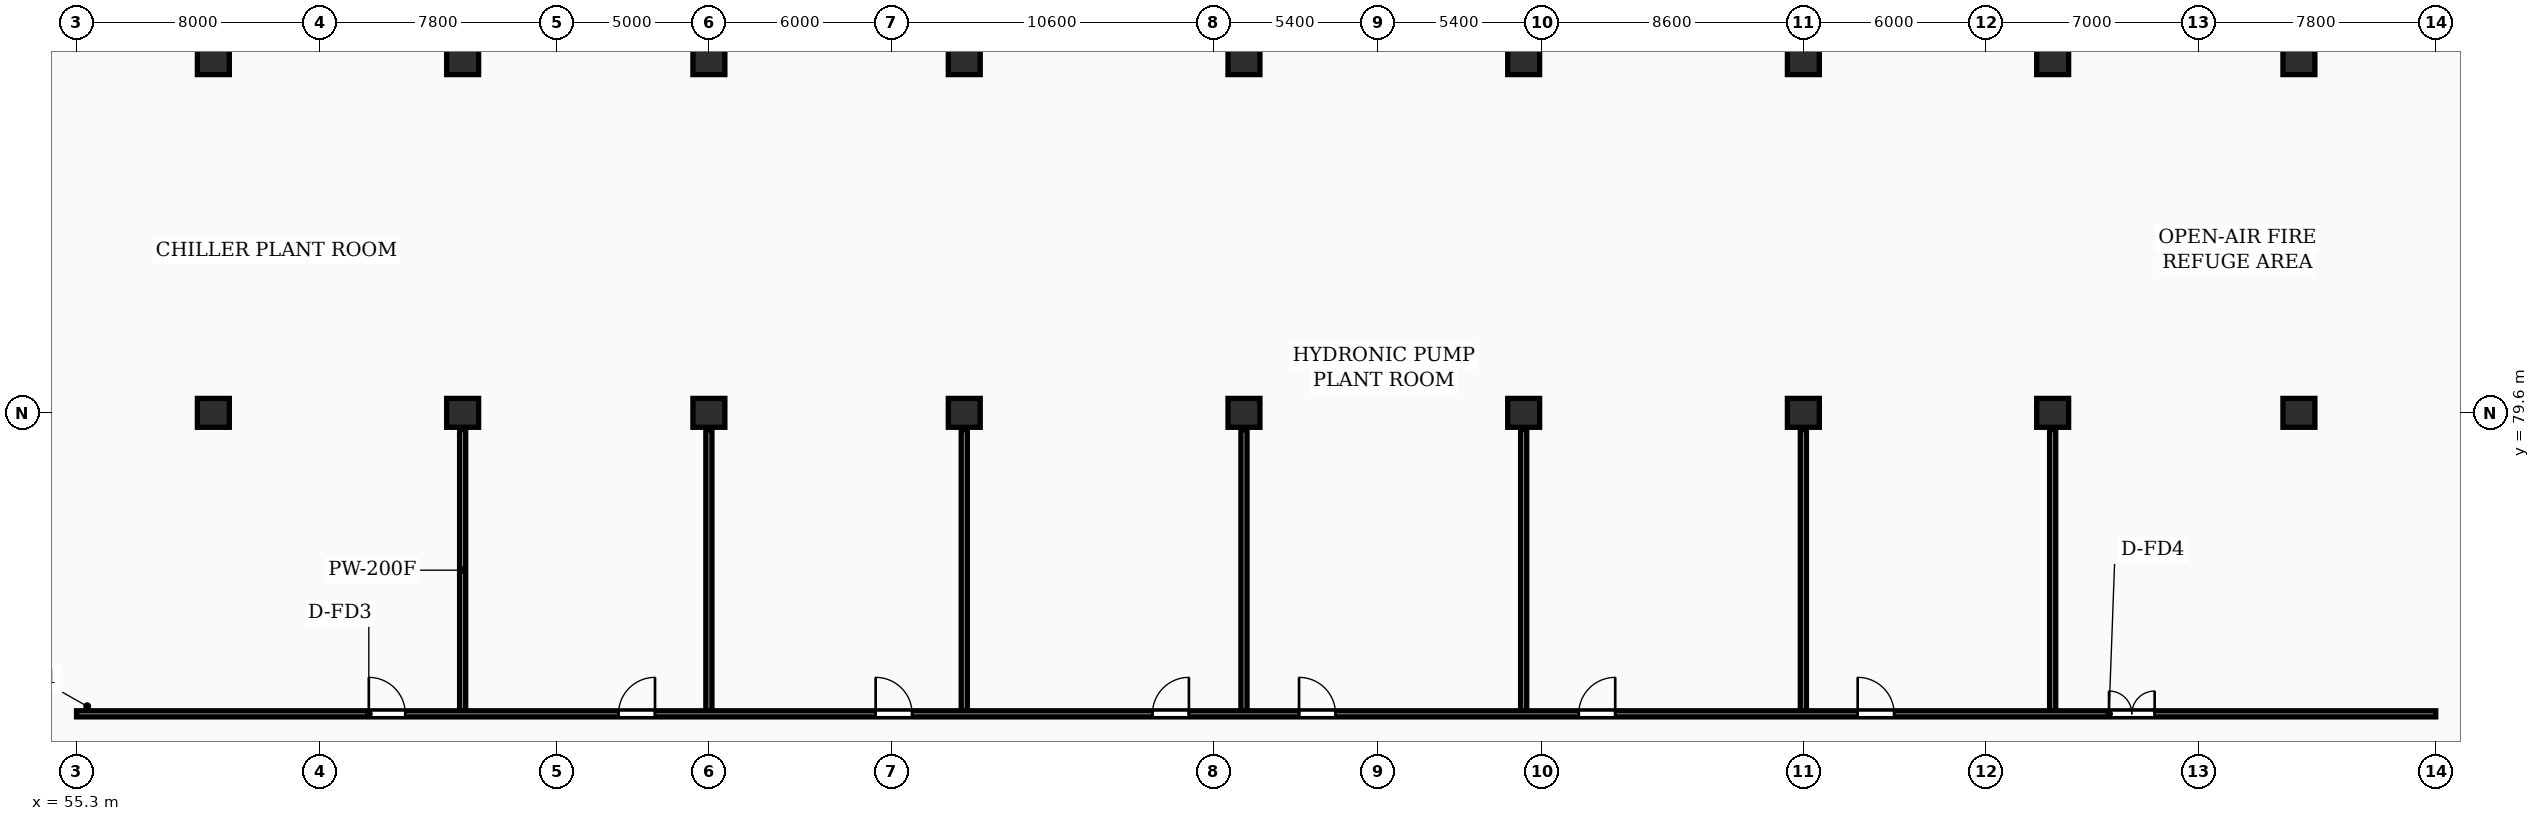
"""IFC4 building model, lengths in metres.
Left out: names, types, materials, properties, quantities, classifications, styles, units other than length and angle.
Written with IfcOpenShell. Run it as: python <this file> out.ifc"""

import sys

from ifc_helpers import new_model, si_unit, direction, frame, frame_2d, origin, origin_2d, place, context, subcontext, project, spatial, rectangle, extrude, element, fill, save


model = new_model("IFC4")
c1 = context("Model", 3, precision=1e-05, world=origin(), true_north=direction((0.0, 1.0)))
c2 = subcontext(c1, "Body", "Model", "MODEL_VIEW")
j1 = project(units=[si_unit("LENGTHUNIT", "METRE"), si_unit("PLANEANGLEUNIT", "RADIAN")], contexts=[c1])
p1 = place(None, origin())
s1 = spatial("IfcSite", under=j1, at=p1, CompositionType="ELEMENT")
p2 = place(p1, origin())
s2 = spatial("IfcBuilding", under=s1, at=p2, CompositionType="ELEMENT")
p3 = place(p2, frame((0.0, 0.0, 76.0)))
s3 = spatial("IfcBuildingStorey", under=s2, at=p3, CompositionType="ELEMENT", Elevation=76.0)
for number, where, z_axis, x_axis in (
    (1, (59.8, 79.6, 0.0), (0.0, 0.0, 1.0), (1.0, 0.0, 0.0)),
    (2, (59.8, 91.2, 0.0), (0.0, 0.0, 1.0), (1.0, 0.0, 0.0)),
    (3, (68.0, 79.6, 0.0), (0.0, 0.0, 1.0), (1.0, 0.0, 0.0)),
    (4, (68.0, 91.2, 0.0), (0.0, 0.0, 1.0), (1.0, 0.0, 0.0)),
    (5, (76.1, 79.6, 0.0), (0.0, 0.0, 1.0), (1.0, 0.0, 0.0)),
    (6, (76.1, 91.2, 0.0), (0.0, 0.0, 1.0), (1.0, 0.0, 0.0)),
    (7, (84.5, 79.6, 0.0), (0.0, 0.0, 1.0), (1.0, 0.0, 0.0)),
    (8, (84.5, 91.2, 0.0), (0.0, 0.0, 1.0), (1.0, 0.0, 0.0)),
    (9, (93.7, 79.6, 0.0), (0.0, 0.0, 1.0), (1.0, 0.0, 0.0)),
    (10, (93.7, 91.2, 0.0), (0.0, 0.0, 1.0), (1.0, 0.0, 0.0)),
    (11, (102.9, 79.6, 0.0), (0.0, 0.0, 1.0), (1.0, 0.0, 0.0)),
    (12, (102.9, 91.2, 0.0), (0.0, 0.0, 1.0), (1.0, 0.0, 0.0)),
    (13, (112.1, 79.6, 0.0), (0.0, 0.0, 1.0), (1.0, 0.0, 0.0)),
    (14, (112.1, 91.2, 0.0), (0.0, 0.0, 1.0), (1.0, 0.0, 0.0)),
    (15, (120.3, 79.6, 0.0), (0.0, 0.0, 1.0), (1.0, 0.0, 0.0)),
    (16, (120.3, 91.2, 0.0), (0.0, 0.0, 1.0), (1.0, 0.0, 0.0)),
    (17, (128.4, 79.6, 0.0), (0.0, 0.0, 1.0), (1.0, 0.0, 0.0)),
    (18, (128.4, 91.2, 0.0), (0.0, 0.0, 1.0), (1.0, 0.0, 0.0)),
):
    element("IfcColumn", number, at=place(p3, frame(where, z_axis=z_axis, x_axis=x_axis)), inside=s3, PredefinedType="COLUMN", context=c2, shape_type="SweptSolid", body=[
        extrude(rectangle(XDim=1.05, YDim=0.95, at=origin_2d()), origin(), (0.0, 0.0, 1.0), 4.8),
    ])
for number, where, z_axis, x_axis in (
    (19, (68.0, 69.8, 0.0), (0.0, 0.0, 1.0), (0.0, 1.0, 0.0)),
    (20, (76.1, 69.8, 0.0), (0.0, 0.0, 1.0), (0.0, 1.0, 0.0)),
    (21, (84.5, 69.8, 0.0), (0.0, 0.0, 1.0), (0.0, 1.0, 0.0)),
    (22, (93.7, 69.8, 0.0), (0.0, 0.0, 1.0), (0.0, 1.0, 0.0)),
    (23, (102.9, 69.8, 0.0), (0.0, 0.0, 1.0), (0.0, 1.0, 0.0)),
    (24, (112.1, 69.8, 0.0), (0.0, 0.0, 1.0), (0.0, 1.0, 0.0)),
    (25, (120.3, 69.8, 0.0), (0.0, 0.0, 1.0), (0.0, 1.0, 0.0)),
):
    element("IfcWall", number, at=place(p3, frame(where, z_axis=z_axis, x_axis=x_axis)), inside=s3, PredefinedType="PARTITIONING", context=c2, shape_type="SweptSolid", body=[
        extrude(rectangle(XDim=9.25, YDim=0.2, at=frame_2d((4.625, 0.0))), origin(), (0.0, 0.0, 1.0), 3.23),
    ])
p4 = place(p3, frame((55.3, 69.7, 0.0), z_axis=(0.0, 0.0, 1.0), x_axis=(1.0, 0.0, 0.0)))
e26 = element("IfcWall", 26, at=p4, inside=s3, PredefinedType="PARTITIONING", context=c2, shape_type="SweptSolid", body=[
    extrude(rectangle(XDim=77.6, YDim=0.2, at=frame_2d((38.8, 0.0))), origin(), (0.0, 0.0, 1.0), 4.48),
])
p5 = place(p4, frame((9.614, 0.0, 0.0)))
e27 = element("IfcOpeningElement", 27, at=p5, cuts=e26, PredefinedType="OPENING", context=c2, shape_type="SweptSolid", body=[
    extrude(rectangle(XDim=1.2, YDim=2.15, at=frame_2d((0.6, 1.075))), frame((0.0, 0.11, 0.0), z_axis=(0.0, -1.0, 0.0), x_axis=(1.0, 0.0, 0.0)), (0.0, 0.0, 1.0), 0.22),
])
p6 = place(p4, frame((17.828, 0.0, 0.0)))
e28 = element("IfcOpeningElement", 28, at=p6, cuts=e26, PredefinedType="OPENING", context=c2, shape_type="SweptSolid", body=[
    extrude(rectangle(XDim=1.2, YDim=2.15, at=frame_2d((0.6, 1.075))), frame((0.0, 0.11, 0.0), z_axis=(0.0, -1.0, 0.0), x_axis=(1.0, 0.0, 0.0)), (0.0, 0.0, 1.0), 0.22),
])
p7 = place(p4, frame((26.285, 0.0, 0.0)))
e29 = element("IfcOpeningElement", 29, at=p7, cuts=e26, PredefinedType="OPENING", context=c2, shape_type="SweptSolid", body=[
    extrude(rectangle(XDim=1.2, YDim=2.15, at=frame_2d((0.6, 1.075))), frame((0.0, 0.11, 0.0), z_axis=(0.0, -1.0, 0.0), x_axis=(1.0, 0.0, 0.0)), (0.0, 0.0, 1.0), 0.22),
])
p8 = place(p4, frame((35.389, 0.0, 0.0)))
e30 = element("IfcOpeningElement", 30, at=p8, cuts=e26, PredefinedType="OPENING", context=c2, shape_type="SweptSolid", body=[
    extrude(rectangle(XDim=1.2, YDim=2.15, at=frame_2d((0.6, 1.075))), frame((0.0, 0.11, 0.0), z_axis=(0.0, -1.0, 0.0), x_axis=(1.0, 0.0, 0.0)), (0.0, 0.0, 1.0), 0.22),
])
p9 = place(p4, frame((40.211, 0.0, 0.0)))
e31 = element("IfcOpeningElement", 31, at=p9, cuts=e26, PredefinedType="OPENING", context=c2, shape_type="SweptSolid", body=[
    extrude(rectangle(XDim=1.2, YDim=2.15, at=frame_2d((0.6, 1.075))), frame((0.0, 0.11, 0.0), z_axis=(0.0, -1.0, 0.0), x_axis=(1.0, 0.0, 0.0)), (0.0, 0.0, 1.0), 0.22),
])
p10 = place(p4, frame((49.411, 0.0, 0.0)))
e32 = element("IfcOpeningElement", 32, at=p10, cuts=e26, PredefinedType="OPENING", context=c2, shape_type="SweptSolid", body=[
    extrude(rectangle(XDim=1.2, YDim=2.15, at=frame_2d((0.6, 1.075))), frame((0.0, 0.11, 0.0), z_axis=(0.0, -1.0, 0.0), x_axis=(1.0, 0.0, 0.0)), (0.0, 0.0, 1.0), 0.22),
])
p11 = place(p4, frame((58.586, 0.0, 0.0)))
e33 = element("IfcOpeningElement", 33, at=p11, cuts=e26, PredefinedType="OPENING", context=c2, shape_type="SweptSolid", body=[
    extrude(rectangle(XDim=1.2, YDim=2.15, at=frame_2d((0.6, 1.075))), frame((0.0, 0.11, 0.0), z_axis=(0.0, -1.0, 0.0), x_axis=(1.0, 0.0, 0.0)), (0.0, 0.0, 1.0), 0.22),
])
p12 = place(p4, frame((66.854, 0.0, 0.0)))
e34 = element("IfcOpeningElement", 34, at=p12, cuts=e26, PredefinedType="OPENING", context=c2, shape_type="SweptSolid", body=[
    extrude(rectangle(XDim=1.5, YDim=2.18, at=frame_2d((0.75, 1.09))), frame((0.0, 0.11, 0.0), z_axis=(0.0, -1.0, 0.0), x_axis=(1.0, 0.0, 0.0)), (0.0, 0.0, 1.0), 0.22),
])
p13 = place(p5, origin())
e35 = element("IfcDoor", 35, at=p13, inside=s3, OperationType="SINGLE_SWING_LEFT", PredefinedType="DOOR", context=c2, shape_type="SweptSolid", body=[
    extrude(rectangle(XDim=1.2, YDim=2.15, at=frame_2d((0.6, 1.075))), frame((0.0, 0.025, 0.0), z_axis=(0.0, -1.0, 0.0), x_axis=(1.0, 0.0, 0.0)), (0.0, 0.0, 1.0), 0.05),
])
fill(e27, e35)
p14 = place(p6, origin())
e36 = element("IfcDoor", 36, at=p14, inside=s3, OperationType="SINGLE_SWING_RIGHT", PredefinedType="DOOR", context=c2, shape_type="SweptSolid", body=[
    extrude(rectangle(XDim=1.2, YDim=2.15, at=frame_2d((0.6, 1.075))), frame((0.0, 0.025, 0.0), z_axis=(0.0, -1.0, 0.0), x_axis=(1.0, 0.0, 0.0)), (0.0, 0.0, 1.0), 0.05),
])
fill(e28, e36)
p15 = place(p7, origin())
e37 = element("IfcDoor", 37, at=p15, inside=s3, OperationType="SINGLE_SWING_LEFT", PredefinedType="DOOR", context=c2, shape_type="SweptSolid", body=[
    extrude(rectangle(XDim=1.2, YDim=2.15, at=frame_2d((0.6, 1.075))), frame((0.0, 0.025, 0.0), z_axis=(0.0, -1.0, 0.0), x_axis=(1.0, 0.0, 0.0)), (0.0, 0.0, 1.0), 0.05),
])
fill(e29, e37)
p16 = place(p8, origin())
e38 = element("IfcDoor", 38, at=p16, inside=s3, OperationType="SINGLE_SWING_RIGHT", PredefinedType="DOOR", context=c2, shape_type="SweptSolid", body=[
    extrude(rectangle(XDim=1.2, YDim=2.15, at=frame_2d((0.6, 1.075))), frame((0.0, 0.025, 0.0), z_axis=(0.0, -1.0, 0.0), x_axis=(1.0, 0.0, 0.0)), (0.0, 0.0, 1.0), 0.05),
])
fill(e30, e38)
p17 = place(p9, origin())
e39 = element("IfcDoor", 39, at=p17, inside=s3, OperationType="SINGLE_SWING_LEFT", PredefinedType="DOOR", context=c2, shape_type="SweptSolid", body=[
    extrude(rectangle(XDim=1.2, YDim=2.15, at=frame_2d((0.6, 1.075))), frame((0.0, 0.025, 0.0), z_axis=(0.0, -1.0, 0.0), x_axis=(1.0, 0.0, 0.0)), (0.0, 0.0, 1.0), 0.05),
])
fill(e31, e39)
p18 = place(p10, origin())
e40 = element("IfcDoor", 40, at=p18, inside=s3, OperationType="SINGLE_SWING_RIGHT", PredefinedType="DOOR", context=c2, shape_type="SweptSolid", body=[
    extrude(rectangle(XDim=1.2, YDim=2.15, at=frame_2d((0.6, 1.075))), frame((0.0, 0.025, 0.0), z_axis=(0.0, -1.0, 0.0), x_axis=(1.0, 0.0, 0.0)), (0.0, 0.0, 1.0), 0.05),
])
fill(e32, e40)
p19 = place(p11, origin())
e41 = element("IfcDoor", 41, at=p19, inside=s3, OperationType="SINGLE_SWING_LEFT", PredefinedType="DOOR", context=c2, shape_type="SweptSolid", body=[
    extrude(rectangle(XDim=1.2, YDim=2.15, at=frame_2d((0.6, 1.075))), frame((0.0, 0.025, 0.0), z_axis=(0.0, -1.0, 0.0), x_axis=(1.0, 0.0, 0.0)), (0.0, 0.0, 1.0), 0.05),
])
fill(e33, e41)
p20 = place(p12, origin())
e42 = element("IfcDoor", 42, at=p20, inside=s3, OperationType="DOUBLE_DOOR_SINGLE_SWING", PredefinedType="DOOR", context=c2, shape_type="SweptSolid", body=[
    extrude(rectangle(XDim=1.5, YDim=2.18, at=frame_2d((0.75, 1.09))), frame((0.0, 0.025, 0.0), z_axis=(0.0, -1.0, 0.0), x_axis=(1.0, 0.0, 0.0)), (0.0, 0.0, 1.0), 0.05),
])
fill(e34, e42)
save(model, sys.argv[1])
